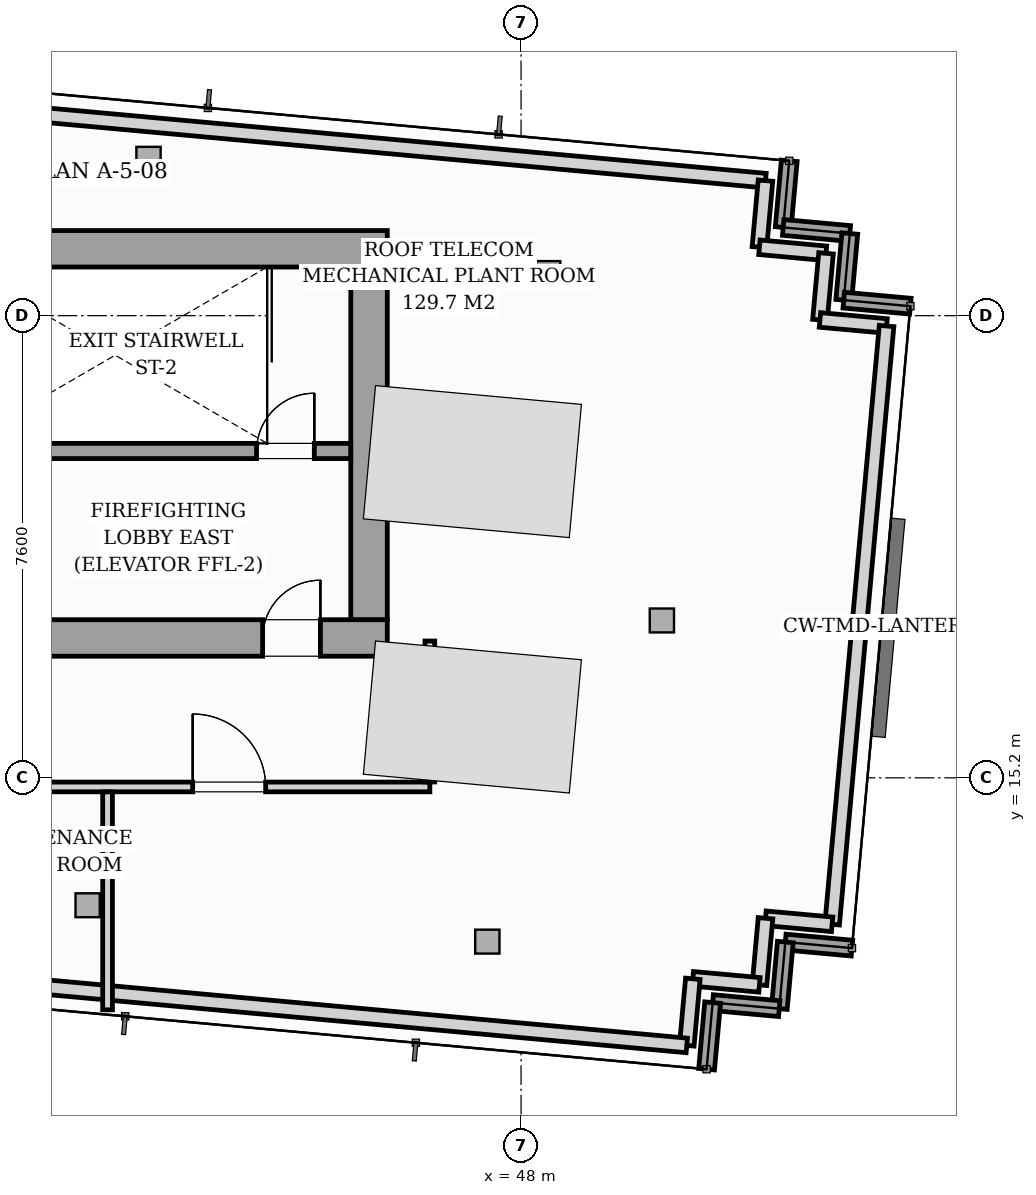
"""IFC4 building model, lengths in metres.
Left out: names, types, materials, properties, quantities, classifications, styles, units other than length and angle.
Written with IfcOpenShell. Run it as: python <this file> out.ifc"""

import sys

from ifc_helpers import new_model, si_unit, direction, frame, frame_2d, origin, origin_2d, place, context, subcontext, project, spatial, rectangle, i_section, extrude, source, transform, mapped, element, fill, save


model = new_model("IFC4")
c1 = context("Model", 3, precision=1e-05, world=origin(), true_north=direction((0.0, 1.0)))
c2 = subcontext(c1, "Body", "Model", "MODEL_VIEW")
j1 = project(units=[si_unit("LENGTHUNIT", "METRE"), si_unit("PLANEANGLEUNIT", "RADIAN")], contexts=[c1])
p1 = place(None, origin())
s1 = spatial("IfcSite", under=j1, at=p1, CompositionType="ELEMENT")
p2 = place(p1, origin())
s2 = spatial("IfcBuilding", under=s1, at=p2, CompositionType="ELEMENT")
p3 = place(p2, frame((0.0, 0.0, 290.3)))
s3 = spatial("IfcBuildingStorey", under=s2, at=p3, CompositionType="ELEMENT", Elevation=290.3)
m1 = source(origin(), c2, "Body", "SweptSolid", [
    extrude(i_section(OverallWidth=0.404, OverallDepth=0.407, WebThickness=0.027, FlangeThickness=0.044, FilletRadius=0.018, at=origin_2d()), origin(), (0.0, 0.0, 1.0), 6.496),
])
for number, where, z_axis, x_axis in (
    (1, (45.6, 17.4, 0.002), (0.0, 0.0, 1.0), (1.0, 0.0, 0.0)),
    (2, (45.6, 24.0, 0.002), (0.0, 0.0, 1.0), (1.0, 0.0, 0.0)),
):
    element("IfcColumn", number, at=place(p3, frame(where, z_axis=z_axis, x_axis=x_axis)), inside=s3, PredefinedType="PILASTER", context=c2, shape_type="MappedRepresentation", body=[
        mapped(m1, transform((0.0, 0.0, 0.0), scale=1.0)),
    ])
m2 = source(origin(), c2, "Body", "SweptSolid", [
    extrude(i_section(OverallWidth=0.399, OverallDepth=0.393, WebThickness=0.023, FlangeThickness=0.037, FilletRadius=0.018, at=origin_2d()), origin(), (0.0, 0.0, 1.0), 6.496),
])
for number, where, z_axis, x_axis in (
    (3, (40.873, 13.104, 0.002), (0.0, 0.0, 1.0), (0.996, -0.091, 0.0)),
    (4, (47.445, 12.506, 0.002), (0.0, 0.0, 1.0), (0.996, -0.091, 0.0)),
    (5, (41.873, 25.38, 0.002), (0.0, 0.0, 1.0), (0.996, -0.091, 0.0)),
    (6, (48.446, 23.501, 0.002), (0.0, 0.0, 1.0), (0.996, -0.091, 0.0)),
    (7, (50.316, 17.788, 0.002), (0.0, 0.0, 1.0), (0.996, -0.091, 0.0)),
):
    element("IfcColumn", number, at=place(p3, frame(where, z_axis=z_axis, x_axis=x_axis)), inside=s3, PredefinedType="COLUMN", context=c2, shape_type="MappedRepresentation", body=[
        mapped(m2, transform((0.0, 0.0, 0.0), scale=1.0)),
    ])
p4 = place(p3, frame((52.411, 25.346, 0.0), z_axis=(0.0, 0.0, 1.0), x_axis=(-0.09077588162, -0.995871346769, 0.0)))
e8 = element("IfcWall", 8, at=p4, inside=s3, PredefinedType="STANDARD", context=c2, shape_type="SweptSolid", body=[
    extrude(rectangle(XDim=1.1, YDim=0.26, at=frame_2d((0.55, 0.0))), origin(), (0.0, 0.0, 1.0), 6.22),
])
p5 = place(p3, frame((52.311, 24.251, 0.0), z_axis=(0.0, 0.0, 1.0), x_axis=(0.995893206468, -0.090535746043, 0.0)))
e9 = element("IfcWall", 9, at=p5, inside=s3, PredefinedType="STANDARD", context=c2, shape_type="SweptSolid", body=[
    extrude(rectangle(XDim=1.1, YDim=0.26, at=frame_2d((0.55, 0.0))), origin(), (0.0, 0.0, 1.0), 6.22),
])
for number, where, z_axis, x_axis in (
    (10, (53.406, 24.151, 0.0), (0.0, 0.0, 1.0), (-0.091, -0.996, 0.0)),
    (11, (53.307, 23.056, 0.0), (0.0, 0.0, 1.0), (0.996, -0.091, 0.0)),
    (12, (53.441, 12.4, 0.0), (0.0, 0.0, 1.0), (-0.996, 0.091, 0.0)),
    (13, (52.346, 12.5, 0.0), (0.0, 0.0, 1.0), (-0.091, -0.996, 0.0)),
    (14, (52.246, 11.404, 0.0), (0.0, 0.0, 1.0), (-0.996, 0.091, 0.0)),
    (15, (51.151, 11.504, 0.0), (0.0, 0.0, 1.0), (-0.091, -0.996, 0.0)),
):
    element("IfcWall", number, at=place(p3, frame(where, z_axis=z_axis, x_axis=x_axis)), inside=s3, PredefinedType="STANDARD", context=c2, shape_type="SweptSolid", body=[
        extrude(rectangle(XDim=1.1, YDim=0.26, at=frame_2d((0.55, 0.0))), origin(), (0.0, 0.0, 1.0), 6.22),
    ])
p6 = place(p3, frame((19.275, 28.001, 6.5), z_axis=(0.0, 0.0, 1.0), x_axis=(0.995883767395, -0.090639515878, 0.0)))
e16 = element("IfcWall", 16, at=p6, inside=s3, PredefinedType="PARAPET", context=c2, shape_type="SweptSolid", body=[
    extrude(rectangle(XDim=32.88, YDim=0.24, at=frame_2d((16.44, 0.0))), origin(), (0.0, 0.0, 1.0), 1.25),
])
for number, where, z_axis, x_axis in (
    (17, (52.02, 25.021, 6.5), (0.0, 0.0, 1.0), (-0.091, -0.996, 0.0)),
    (18, (51.92, 23.925, 6.5), (0.0, 0.0, 1.0), (0.996, -0.091, 0.0)),
    (19, (53.015, 23.825, 6.5), (0.0, 0.0, 1.0), (-0.091, -0.996, 0.0)),
    (20, (52.916, 22.73, 6.5), (0.0, 0.0, 1.0), (0.996, -0.091, 0.0)),
):
    element("IfcWall", number, at=place(p3, frame(where, z_axis=z_axis, x_axis=x_axis)), inside=s3, PredefinedType="PARAPET", context=c2, shape_type="SweptSolid", body=[
        extrude(rectangle(XDim=1.1, YDim=0.24, at=frame_2d((0.55, 0.0))), origin(), (0.0, 0.0, 1.0), 1.25),
    ])
p7 = place(p3, frame((54.011, 22.63, 6.5), z_axis=(0.0, 0.0, 1.0), x_axis=(-0.09063823351, -0.995883884108, 0.0)))
e21 = element("IfcWall", 21, at=p7, inside=s3, PredefinedType="PARAPET", context=c2, shape_type="SweptSolid", body=[
    extrude(rectangle(XDim=9.88, YDim=0.24, at=frame_2d((4.94, 0.0))), origin(), (0.0, 0.0, 1.0), 1.25),
])
for number, where, z_axis, x_axis in (
    (22, (53.115, 12.791, 6.5), (0.0, 0.0, 1.0), (-0.996, 0.091, 0.0)),
    (23, (52.02, 12.891, 6.5), (0.0, 0.0, 1.0), (-0.091, -0.996, 0.0)),
    (24, (51.92, 11.795, 6.5), (0.0, 0.0, 1.0), (-0.996, 0.091, 0.0)),
    (25, (50.825, 11.895, 6.5), (0.0, 0.0, 1.0), (-0.091, -0.996, 0.0)),
):
    element("IfcWall", number, at=place(p3, frame(where, z_axis=z_axis, x_axis=x_axis)), inside=s3, PredefinedType="PARAPET", context=c2, shape_type="SweptSolid", body=[
        extrude(rectangle(XDim=1.1, YDim=0.24, at=frame_2d((0.55, 0.0))), origin(), (0.0, 0.0, 1.0), 1.25),
    ])
p8 = place(p3, frame((50.725, 10.799, 6.5), z_axis=(0.0, 0.0, 1.0), x_axis=(-0.995884437615, 0.090632151664, 0.0)))
e26 = element("IfcWall", 26, at=p8, inside=s3, PredefinedType="PARAPET", context=c2, shape_type="SweptSolid", body=[
    extrude(rectangle(XDim=32.88, YDim=0.24, at=frame_2d((16.44, 0.0))), origin(), (0.0, 0.0, 1.0), 1.25),
])
p9 = place(p3, frame((26.2, 17.5, 0.0), z_axis=(0.0, 0.0, 1.0), x_axis=(1.0, 0.0, 0.0)))
e27 = element("IfcWall", 27, at=p9, inside=s3, PredefinedType="SHEAR", context=c2, shape_type="SweptSolid", body=[
    extrude(rectangle(XDim=19.6, YDim=0.6, at=frame_2d((9.8, 0.0))), origin(), (0.0, 0.0, 1.0), 6.5),
])
p10 = place(p9, frame((0.95, 0.0, 0.0)))
e28 = element("IfcOpeningElement", 28, at=p10, cuts=e27, PredefinedType="OPENING", context=c2, shape_type="SweptSolid", body=[
    extrude(rectangle(XDim=0.95, YDim=2.06, at=frame_2d((0.475, 1.03))), frame((0.0, 0.31, 0.0), z_axis=(0.0, -1.0, 0.0), x_axis=(1.0, 0.0, 0.0)), (0.0, 0.0, 1.0), 0.62),
])
p11 = place(p9, frame((9.38, 0.0, 0.0)))
e29 = element("IfcOpeningElement", 29, at=p11, cuts=e27, PredefinedType="OPENING", context=c2, shape_type="SweptSolid", body=[
    extrude(rectangle(XDim=0.9, YDim=2.06, at=frame_2d((0.45, 1.03))), frame((0.0, 0.31, 0.0), z_axis=(0.0, -1.0, 0.0), x_axis=(1.0, 0.0, 0.0)), (0.0, 0.0, 1.0), 0.62),
])
p12 = place(p9, frame((17.55, 0.0, 0.0)))
e30 = element("IfcOpeningElement", 30, at=p12, cuts=e27, PredefinedType="OPENING", context=c2, shape_type="SweptSolid", body=[
    extrude(rectangle(XDim=0.95, YDim=2.06, at=frame_2d((0.475, 1.03))), frame((0.0, 0.31, 0.0), z_axis=(0.0, -1.0, 0.0), x_axis=(1.0, 0.0, 0.0)), (0.0, 0.0, 1.0), 0.62),
])
p13 = place(p3, frame((26.2, 23.9, 0.0), z_axis=(0.0, 0.0, 1.0), x_axis=(1.0, 0.0, 0.0)))
e31 = element("IfcWall", 31, at=p13, inside=s3, PredefinedType="SHEAR", context=c2, shape_type="SweptSolid", body=[
    extrude(rectangle(XDim=19.6, YDim=0.6, at=frame_2d((9.8, 0.0))), origin(), (0.0, 0.0, 1.0), 6.5),
])
p14 = place(p3, frame((45.5, 17.802, 0.0), z_axis=(0.0, 0.0, 1.0), x_axis=(0.0, 1.0, 0.0)))
e32 = element("IfcWall", 32, at=p14, inside=s3, PredefinedType="SHEAR", context=c2, shape_type="SweptSolid", body=[
    extrude(rectangle(XDim=5.796, YDim=0.6, at=frame_2d((2.898, 0.0))), origin(), (0.0, 0.0, 1.0), 6.5),
])
p15 = place(p3, frame((37.05, 20.575, 0.0), z_axis=(0.0, 0.0, 1.0), x_axis=(1.0, 0.0, 0.0)))
e33 = element("IfcWall", 33, at=p15, inside=s3, PredefinedType="SOLIDWALL", context=c2, shape_type="SweptSolid", body=[
    extrude(rectangle(XDim=8.148, YDim=0.25, at=frame_2d((4.074, 0.0))), origin(), (0.0, 0.0, 1.0), 6.5),
])
p16 = place(p15, frame((6.6, 0.0, 0.0)))
e34 = element("IfcOpeningElement", 34, at=p16, cuts=e33, PredefinedType="OPENING", context=c2, shape_type="SweptSolid", body=[
    extrude(rectangle(XDim=0.95, YDim=2.06, at=frame_2d((0.475, 1.03))), frame((0.0, 0.135, 0.0), z_axis=(0.0, -1.0, 0.0), x_axis=(1.0, 0.0, 0.0)), (0.0, 0.0, 1.0), 0.27),
])
p17 = place(p3, frame((25.5, 15.05, 0.0), z_axis=(0.0, 0.0, 1.0), x_axis=(1.0, 0.0, 0.0)))
e35 = element("IfcWall", 35, at=p17, inside=s3, PredefinedType="PARTITIONING", context=c2, shape_type="SweptSolid", body=[
    extrude(rectangle(XDim=21.0, YDim=0.16, at=frame_2d((10.5, 0.0))), origin(), (0.0, 0.0, 1.0), 5.948),
])
p18 = place(p17, frame((3.17, 0.0, 0.0)))
e36 = element("IfcOpeningElement", 36, at=p18, cuts=e35, PredefinedType="OPENING", context=c2, shape_type="SweptSolid", body=[
    extrude(rectangle(XDim=1.2, YDim=2.08, at=frame_2d((0.6, 1.04))), frame((0.0, 0.09, 0.0), z_axis=(0.0, -1.0, 0.0), x_axis=(1.0, 0.0, 0.0)), (0.0, 0.0, 1.0), 0.18),
])
p19 = place(p17, frame((6.7, 0.0, 0.0)))
e37 = element("IfcOpeningElement", 37, at=p19, cuts=e35, PredefinedType="OPENING", context=c2, shape_type="SweptSolid", body=[
    extrude(rectangle(XDim=1.2, YDim=2.08, at=frame_2d((0.6, 1.04))), frame((0.0, 0.09, 0.0), z_axis=(0.0, -1.0, 0.0), x_axis=(1.0, 0.0, 0.0)), (0.0, 0.0, 1.0), 0.18),
])
p20 = place(p17, frame((17.1, 0.0, 0.0)))
e38 = element("IfcOpeningElement", 38, at=p20, cuts=e35, PredefinedType="OPENING", context=c2, shape_type="SweptSolid", body=[
    extrude(rectangle(XDim=1.2, YDim=2.08, at=frame_2d((0.6, 1.04))), frame((0.0, 0.09, 0.0), z_axis=(0.0, -1.0, 0.0), x_axis=(1.0, 0.0, 0.0)), (0.0, 0.0, 1.0), 0.18),
])
p21 = place(p3, frame((46.5, 15.132, 0.0), z_axis=(0.0, 0.0, 1.0), x_axis=(0.0, 1.0, 0.0)))
e39 = element("IfcWall", 39, at=p21, inside=s3, PredefinedType="PARTITIONING", context=c2, shape_type="SweptSolid", body=[
    extrude(rectangle(XDim=2.318, YDim=0.16, at=frame_2d((1.159, 0.0))), origin(), (0.0, 0.0, 1.0), 6.22),
])
p22 = place(p3, frame((41.2, 11.385, 0.0), z_axis=(0.0, 0.0, 1.0), x_axis=(0.0, 1.0, 0.0)))
e40 = element("IfcWall", 40, at=p22, inside=s3, PredefinedType="PARTITIONING", context=c2, shape_type="SweptSolid", body=[
    extrude(rectangle(XDim=3.583, YDim=0.16, at=frame_2d((1.792, 0.0))), origin(), (0.0, 0.0, 1.0), 6.22),
])
m3 = source(origin(), c2, "Body", "SweptSolid", [
    extrude(rectangle(XDim=0.95, YDim=2.06, at=frame_2d((0.475, 1.03))), frame((0.0, 0.025, 0.0), z_axis=(0.0, -1.0, 0.0), x_axis=(1.0, 0.0, 0.0)), (0.0, 0.0, 1.0), 0.05),
])
p23 = place(p12, origin())
e41 = element("IfcDoor", 41, at=p23, inside=s3, OperationType="SINGLE_SWING_RIGHT", PredefinedType="DOOR", context=c2, shape_type="MappedRepresentation", body=[
    mapped(m3, transform((0.0, 0.0, 0.0), scale=1.0)),
])
fill(e30, e41)
p24 = place(p16, origin())
e42 = element("IfcDoor", 42, at=p24, inside=s3, OperationType="SINGLE_SWING_RIGHT", PredefinedType="DOOR", context=c2, shape_type="MappedRepresentation", body=[
    mapped(m3, transform((0.0, 0.0, 0.0), scale=1.0)),
])
fill(e34, e42)
m4 = source(origin(), c2, "Body", "SweptSolid", [
    extrude(rectangle(XDim=1.2, YDim=2.08, at=frame_2d((0.6, 1.04))), frame((0.0, 0.025, 0.0), z_axis=(0.0, -1.0, 0.0), x_axis=(1.0, 0.0, 0.0)), (0.0, 0.0, 1.0), 0.05),
])
p25 = place(p20, origin())
e43 = element("IfcDoor", 43, at=p25, inside=s3, OperationType="SINGLE_SWING_LEFT", PredefinedType="DOOR", context=c2, shape_type="MappedRepresentation", body=[
    mapped(m4, transform((0.0, 0.0, 0.0), scale=1.0)),
])
fill(e38, e43)
save(model, sys.argv[1])
